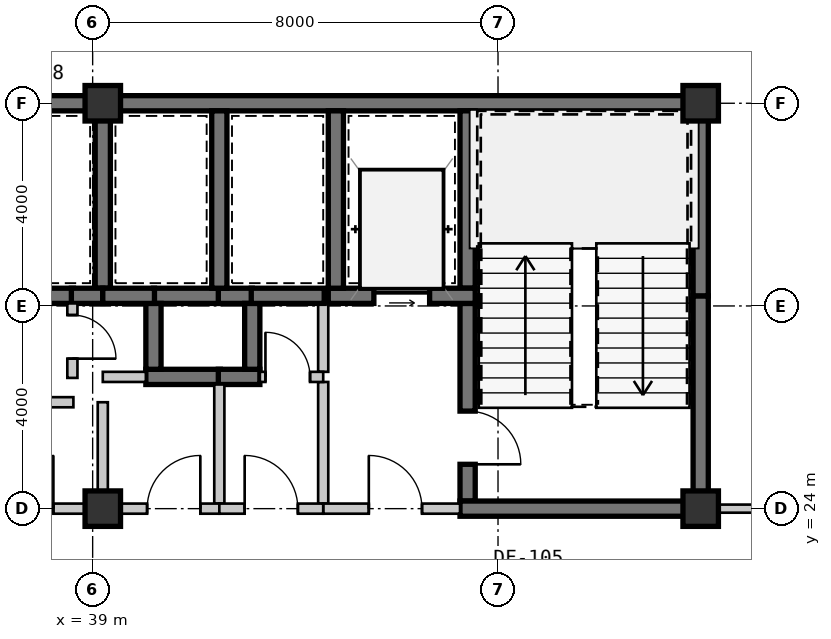
"""IFC4 building model, lengths in metres.
Left out: names, types, materials, properties, quantities, classifications, styles, units other than length and angle.
Written with IfcOpenShell. Run it as: python <this file> out.ifc"""

import sys

from ifc_helpers import new_model, si_unit, direction, frame, frame_2d, origin, origin_2d, place, context, subcontext, project, spatial, rectangle, extrude, source, transform, mapped, element, fill, save


model = new_model("IFC4")
c1 = context("Model", 3, precision=1e-05, world=origin(), true_north=direction((0.0, 1.0)))
c2 = subcontext(c1, "Body", "Model", "MODEL_VIEW")
j1 = project(units=[si_unit("LENGTHUNIT", "METRE"), si_unit("PLANEANGLEUNIT", "RADIAN")], contexts=[c1])
p1 = place(None, origin())
s1 = spatial("IfcSite", under=j1, at=p1, CompositionType="ELEMENT")
p2 = place(p1, origin())
s2 = spatial("IfcBuilding", under=s1, at=p2, CompositionType="ELEMENT")
p3 = place(p2, frame((0.0, 0.0, 65.1)))
s3 = spatial("IfcBuildingStorey", under=s2, at=p3, CompositionType="ELEMENT", Elevation=65.1)
m1 = source(origin(), c2, "Body", "SweptSolid", [
    extrude(rectangle(XDim=0.7, YDim=0.7, at=origin_2d()), origin(), (0.0, 0.0, 1.0), 3.15),
])
for number, where, z_axis, x_axis in (
    (1, (39.2, 24.0, 0.0), (0.0, 0.0, 1.0), (1.0, 0.0, 0.0)),
    (2, (51.0, 24.0, 0.0), (0.0, 0.0, 1.0), (1.0, 0.0, 0.0)),
    (3, (39.2, 32.0, 0.0), (0.0, 0.0, 1.0), (1.0, 0.0, 0.0)),
    (4, (51.0, 32.0, 0.0), (0.0, 0.0, 1.0), (1.0, 0.0, 0.0)),
):
    element("IfcColumn", number, at=place(p3, frame(where, z_axis=z_axis, x_axis=x_axis)), inside=s3, PredefinedType="COLUMN", context=c2, shape_type="MappedRepresentation", body=[
        mapped(m1, transform((0.0, 0.0, 0.0), scale=1.0)),
    ])
m2 = source(origin(), c2, "Body", "SweptSolid", [
    extrude(rectangle(XDim=11.2, YDim=0.3, at=frame_2d((5.6, 0.0))), origin(), (0.0, 0.0, 1.0), 2.93),
])
p4 = place(p3, frame((28.0, 32.0, 0.0), z_axis=(0.0, 0.0, 1.0), x_axis=(1.0, 0.0, 0.0)))
e5 = element("IfcWall", 5, at=p4, inside=s3, PredefinedType="SHEAR", context=c2, shape_type="MappedRepresentation", body=[
    mapped(m2, transform((0.0, 0.0, 0.0), scale=1.0)),
])
m3 = source(origin(), c2, "Body", "SweptSolid", [
    extrude(rectangle(XDim=11.95, YDim=0.3, at=frame_2d((5.975, 0.0))), origin(), (0.0, 0.0, 1.0), 2.93),
])
p5 = place(p3, frame((39.2, 32.0, 0.0), z_axis=(0.0, 0.0, 1.0), x_axis=(1.0, 0.0, 0.0)))
e6 = element("IfcWall", 6, at=p5, inside=s3, PredefinedType="SHEAR", context=c2, shape_type="MappedRepresentation", body=[
    mapped(m3, transform((0.0, 0.0, 0.0), scale=1.0)),
])
m4 = source(origin(), c2, "Body", "SweptSolid", [
    extrude(rectangle(XDim=4.05, YDim=0.3, at=frame_2d((2.025, 0.0))), origin(), (0.0, 0.0, 1.0), 2.93),
])
p6 = place(p3, frame((51.0, 24.15, 0.0), z_axis=(0.0, 0.0, 1.0), x_axis=(0.0, 1.0, 0.0)))
e7 = element("IfcWall", 7, at=p6, inside=s3, PredefinedType="SHEAR", context=c2, shape_type="MappedRepresentation", body=[
    mapped(m4, transform((0.0, 0.0, 0.0), scale=1.0)),
])
m5 = source(origin(), c2, "Body", "SweptSolid", [
    extrude(rectangle(XDim=3.65, YDim=0.3, at=frame_2d((1.825, 0.0))), origin(), (0.0, 0.0, 1.0), 2.93),
])
p7 = place(p3, frame((51.0, 28.2, 0.0), z_axis=(0.0, 0.0, 1.0), x_axis=(0.0, 1.0, 0.0)))
e8 = element("IfcWall", 8, at=p7, inside=s3, PredefinedType="SHEAR", context=c2, shape_type="MappedRepresentation", body=[
    mapped(m5, transform((0.0, 0.0, 0.0), scale=1.0)),
])
m6 = source(origin(), c2, "Body", "SweptSolid", [
    extrude(rectangle(XDim=3.5, YDim=0.3, at=frame_2d((1.75, 0.0))), origin(), (0.0, 0.0, 1.0), 2.93),
])
p8 = place(p3, frame((46.4, 31.85, 0.0), z_axis=(0.0, 0.0, 1.0), x_axis=(0.0, -1.0, 0.0)))
e9 = element("IfcWall", 9, at=p8, inside=s3, PredefinedType="SHEAR", context=c2, shape_type="MappedRepresentation", body=[
    mapped(m6, transform((0.0, 0.0, 0.0), scale=1.0)),
])
m7 = source(origin(), c2, "Body", "SweptSolid", [
    extrude(rectangle(XDim=3.9, YDim=0.3, at=frame_2d((1.95, 0.0))), origin(), (0.0, 0.0, 1.0), 2.93),
])
p9 = place(p3, frame((46.4, 28.05, 0.0), z_axis=(0.0, 0.0, 1.0), x_axis=(0.0, -1.0, 0.0)))
e10 = element("IfcWall", 10, at=p9, inside=s3, PredefinedType="SHEAR", context=c2, shape_type="MappedRepresentation", body=[
    mapped(m7, transform((0.0, 0.0, 0.0), scale=1.0)),
])
m8 = source(origin(), c2, "Body", "SweptSolid", [
    extrude(rectangle(XDim=1.05, YDim=2.1, at=frame_2d((0.525, 1.05))), frame((0.0, 0.16, 0.0), z_axis=(0.0, -1.0, 0.0), x_axis=(1.0, 0.0, 0.0)), (0.0, 0.0, 1.0), 0.32),
])
p10 = place(p9, frame((2.125, 0.0, 0.0)))
e11 = element("IfcOpeningElement", 11, at=p10, cuts=e10, PredefinedType="OPENING", context=c2, shape_type="MappedRepresentation", body=[
    mapped(m8, transform((0.0, 0.0, 0.0), scale=1.0)),
])
m9 = source(origin(), c2, "Body", "SweptSolid", [
    extrude(rectangle(XDim=4.9, YDim=0.3, at=frame_2d((2.45, 0.0))), origin(), (0.0, 0.0, 1.0), 2.93),
])
p11 = place(p3, frame((46.25, 24.0, 0.0), z_axis=(0.0, 0.0, 1.0), x_axis=(1.0, 0.0, 0.0)))
e12 = element("IfcWall", 12, at=p11, inside=s3, PredefinedType="SHEAR", context=c2, shape_type="MappedRepresentation", body=[
    mapped(m9, transform((0.0, 0.0, 0.0), scale=1.0)),
])
m10 = source(origin(), c2, "Body", "SweptSolid", [
    extrude(rectangle(XDim=2.9, YDim=0.3, at=frame_2d((1.45, 0.0))), origin(), (0.0, 0.0, 1.0), 2.93),
])
p12 = place(p3, frame((43.65, 28.2, 0.0), z_axis=(0.0, 0.0, 1.0), x_axis=(1.0, 0.0, 0.0)))
e13 = element("IfcWall", 13, at=p12, inside=s3, PredefinedType="SHEAR", context=c2, shape_type="MappedRepresentation", body=[
    mapped(m10, transform((0.0, 0.0, 0.0), scale=1.0)),
])
m11 = source(origin(), c2, "Body", "SweptSolid", [
    extrude(rectangle(XDim=1.1, YDim=2.15, at=frame_2d((0.55, 1.075))), frame((0.0, 0.16, 0.0), z_axis=(0.0, -1.0, 0.0), x_axis=(1.0, 0.0, 0.0)), (0.0, 0.0, 1.0), 0.32),
])
p13 = place(p12, frame((0.9, 0.0, 0.0)))
e14 = element("IfcOpeningElement", 14, at=p13, cuts=e13, PredefinedType="OPENING", context=c2, shape_type="MappedRepresentation", body=[
    mapped(m11, transform((0.0, 0.0, 0.0), scale=1.0)),
])
p14 = place(p3, frame((43.8, 31.85, 0.0), z_axis=(0.0, 0.0, 1.0), x_axis=(0.0, -1.0, 0.0)))
e15 = element("IfcWall", 15, at=p14, inside=s3, PredefinedType="SHEAR", context=c2, shape_type="MappedRepresentation", body=[
    mapped(m6, transform((0.0, 0.0, 0.0), scale=1.0)),
])
m12 = source(origin(), c2, "Body", "SweptSolid", [
    extrude(rectangle(XDim=2.4, YDim=0.2, at=frame_2d((1.2, 0.0))), origin(), (0.0, 0.0, 1.0), 2.93),
])
p15 = place(p3, frame((43.55, 26.5, 0.0), z_axis=(0.0, 0.0, 1.0), x_axis=(0.0, -1.0, 0.0)))
e16 = element("IfcWall", 16, at=p15, inside=s3, PredefinedType="SOLIDWALL", context=c2, shape_type="MappedRepresentation", body=[
    mapped(m12, transform((0.0, 0.0, 0.0), scale=1.0)),
])
m13 = source(origin(), c2, "Body", "SweptSolid", [
    extrude(rectangle(XDim=1.35, YDim=0.2, at=frame_2d((0.675, 0.0))), origin(), (0.0, 0.0, 1.0), 2.93),
])
p16 = place(p3, frame((43.55, 28.05, 0.0), z_axis=(0.0, 0.0, 1.0), x_axis=(0.0, -1.0, 0.0)))
e17 = element("IfcWall", 17, at=p16, inside=s3, PredefinedType="SOLIDWALL", context=c2, shape_type="MappedRepresentation", body=[
    mapped(m13, transform((0.0, 0.0, 0.0), scale=1.0)),
])
m14 = source(origin(), c2, "Body", "SweptSolid", [
    extrude(rectangle(XDim=2.7, YDim=0.2, at=frame_2d((1.35, 0.0))), origin(), (0.0, 0.0, 1.0), 2.397),
])
p17 = place(p3, frame((43.55, 24.0, 0.0), z_axis=(0.0, 0.0, 1.0), x_axis=(1.0, 0.0, 0.0)))
e18 = element("IfcWall", 18, at=p17, inside=s3, PredefinedType="SOLIDWALL", context=c2, shape_type="MappedRepresentation", body=[
    mapped(m14, transform((0.0, 0.0, 0.0), scale=1.0)),
])
m15 = source(origin(), c2, "Body", "SweptSolid", [
    extrude(rectangle(XDim=1.05, YDim=2.1, at=frame_2d((0.525, 1.05))), frame((0.0, 0.11, 0.0), z_axis=(0.0, -1.0, 0.0), x_axis=(1.0, 0.0, 0.0)), (0.0, 0.0, 1.0), 0.22),
])
p18 = place(p17, frame((0.9, 0.0, 0.0)))
e19 = element("IfcOpeningElement", 19, at=p18, cuts=e18, PredefinedType="OPENING", context=c2, shape_type="MappedRepresentation", body=[
    mapped(m15, transform((0.0, 0.0, 0.0), scale=1.0)),
])
m16 = source(origin(), c2, "Body", "SweptSolid", [
    extrude(rectangle(XDim=1.32, YDim=0.3, at=frame_2d((0.66, 0.0))), origin(), (0.0, 0.0, 1.0), 2.93),
])
p19 = place(p3, frame((41.52, 28.2, 0.0), z_axis=(0.0, 0.0, 1.0), x_axis=(-1.0, 0.0, 0.0)))
e20 = element("IfcWall", 20, at=p19, inside=s3, PredefinedType="SHEAR", context=c2, shape_type="MappedRepresentation", body=[
    mapped(m16, transform((0.0, 0.0, 0.0), scale=1.0)),
])
m17 = source(origin(), c2, "Body", "SweptSolid", [
    extrude(rectangle(XDim=0.67, YDim=0.3, at=frame_2d((0.335, 0.0))), origin(), (0.0, 0.0, 1.0), 2.93),
])
p20 = place(p3, frame((42.15, 28.2, 0.0), z_axis=(0.0, 0.0, 1.0), x_axis=(-1.0, 0.0, 0.0)))
e21 = element("IfcWall", 21, at=p20, inside=s3, PredefinedType="SHEAR", context=c2, shape_type="MappedRepresentation", body=[
    mapped(m17, transform((0.0, 0.0, 0.0), scale=1.0)),
])
m18 = source(origin(), c2, "Body", "SweptSolid", [
    extrude(rectangle(XDim=1.47, YDim=0.3, at=frame_2d((0.735, 0.0))), origin(), (0.0, 0.0, 1.0), 2.93),
])
p21 = place(p3, frame((40.05, 26.6, 0.0), z_axis=(0.0, 0.0, 1.0), x_axis=(1.0, 0.0, 0.0)))
e22 = element("IfcWall", 22, at=p21, inside=s3, PredefinedType="SHEAR", context=c2, shape_type="MappedRepresentation", body=[
    mapped(m18, transform((0.0, 0.0, 0.0), scale=1.0)),
])
m19 = source(origin(), c2, "Body", "SweptSolid", [
    extrude(rectangle(XDim=1.3, YDim=0.3, at=frame_2d((0.65, 0.0))), origin(), (0.0, 0.0, 1.0), 2.93),
])
p22 = place(p3, frame((40.2, 28.05, 0.0), z_axis=(0.0, 0.0, 1.0), x_axis=(0.0, -1.0, 0.0)))
e23 = element("IfcWall", 23, at=p22, inside=s3, PredefinedType="SHEAR", context=c2, shape_type="MappedRepresentation", body=[
    mapped(m19, transform((0.0, 0.0, 0.0), scale=1.0)),
])
m20 = source(origin(), c2, "Body", "SweptSolid", [
    extrude(rectangle(XDim=0.82, YDim=0.3, at=frame_2d((0.41, 0.0))), origin(), (0.0, 0.0, 1.0), 2.93),
])
p23 = place(p3, frame((41.48, 26.6, 0.0), z_axis=(0.0, 0.0, 1.0), x_axis=(1.0, 0.0, 0.0)))
e24 = element("IfcWall", 24, at=p23, inside=s3, PredefinedType="SHEAR", context=c2, shape_type="MappedRepresentation", body=[
    mapped(m20, transform((0.0, 0.0, 0.0), scale=1.0)),
])
p24 = place(p3, frame((42.15, 26.75, 0.0), z_axis=(0.0, 0.0, 1.0), x_axis=(0.0, 1.0, 0.0)))
e25 = element("IfcWall", 25, at=p24, inside=s3, PredefinedType="SHEAR", context=c2, shape_type="MappedRepresentation", body=[
    mapped(m19, transform((0.0, 0.0, 0.0), scale=1.0)),
])
p25 = place(p3, frame((39.2, 28.35, 0.0), z_axis=(0.0, 0.0, 1.0), x_axis=(0.0, 1.0, 0.0)))
e26 = element("IfcWall", 26, at=p25, inside=s3, PredefinedType="SHEAR", context=c2, shape_type="MappedRepresentation", body=[
    mapped(m6, transform((0.0, 0.0, 0.0), scale=1.0)),
])
m21 = source(origin(), c2, "Body", "SweptSolid", [
    extrude(rectangle(XDim=1.92, YDim=0.3, at=frame_2d((0.96, 0.0))), origin(), (0.0, 0.0, 1.0), 2.93),
])
p26 = place(p3, frame((36.7, 28.2, 0.0), z_axis=(0.0, 0.0, 1.0), x_axis=(1.0, 0.0, 0.0)))
e27 = element("IfcWall", 27, at=p26, inside=s3, PredefinedType="SHEAR", context=c2, shape_type="MappedRepresentation", body=[
    mapped(m21, transform((0.0, 0.0, 0.0), scale=1.0)),
])
m22 = source(origin(), c2, "Body", "SweptSolid", [
    extrude(rectangle(XDim=0.62, YDim=0.3, at=frame_2d((0.31, 0.0))), origin(), (0.0, 0.0, 1.0), 2.93),
])
p27 = place(p3, frame((38.58, 28.2, 0.0), z_axis=(0.0, 0.0, 1.0), x_axis=(1.0, 0.0, 0.0)))
e28 = element("IfcWall", 28, at=p27, inside=s3, PredefinedType="SHEAR", context=c2, shape_type="MappedRepresentation", body=[
    mapped(m22, transform((0.0, 0.0, 0.0), scale=1.0)),
])
p28 = place(p3, frame((41.5, 28.35, 0.0), z_axis=(0.0, 0.0, 1.0), x_axis=(0.0, 1.0, 0.0)))
e29 = element("IfcWall", 29, at=p28, inside=s3, PredefinedType="SHEAR", context=c2, shape_type="MappedRepresentation", body=[
    mapped(m6, transform((0.0, 0.0, 0.0), scale=1.0)),
])
m23 = source(origin(), c2, "Body", "SweptSolid", [
    extrude(rectangle(XDim=1.02, YDim=0.3, at=frame_2d((0.51, 0.0))), origin(), (0.0, 0.0, 1.0), 2.93),
])
p29 = place(p3, frame((39.2, 28.2, 0.0), z_axis=(0.0, 0.0, 1.0), x_axis=(1.0, 0.0, 0.0)))
e30 = element("IfcWall", 30, at=p29, inside=s3, PredefinedType="SHEAR", context=c2, shape_type="MappedRepresentation", body=[
    mapped(m23, transform((0.0, 0.0, 0.0), scale=1.0)),
])
m24 = source(origin(), c2, "Body", "SweptSolid", [
    extrude(rectangle(XDim=1.44, YDim=0.3, at=frame_2d((0.72, 0.0))), origin(), (0.0, 0.0, 1.0), 2.93),
])
p30 = place(p3, frame((42.13, 28.2, 0.0), z_axis=(0.0, 0.0, 1.0), x_axis=(1.0, 0.0, 0.0)))
e31 = element("IfcWall", 31, at=p30, inside=s3, PredefinedType="SHEAR", context=c2, shape_type="MappedRepresentation", body=[
    mapped(m24, transform((0.0, 0.0, 0.0), scale=1.0)),
])
m25 = source(origin(), c2, "Body", "SweptSolid", [
    extrude(rectangle(XDim=2.42, YDim=0.2, at=frame_2d((1.21, 0.0))), origin(), (0.0, 0.0, 1.0), 2.93),
])
p31 = place(p3, frame((36.2, 26.1, 0.0), z_axis=(0.0, 0.0, 1.0), x_axis=(1.0, 0.0, 0.0)))
e32 = element("IfcWall", 32, at=p31, inside=s3, PredefinedType="SOLIDWALL", context=c2, shape_type="MappedRepresentation", body=[
    mapped(m25, transform((0.0, 0.0, 0.0), scale=1.0)),
])
p32 = place(p31, frame((0.685, 0.0, 0.0)))
e33 = element("IfcOpeningElement", 33, at=p32, cuts=e32, PredefinedType="OPENING", context=c2, shape_type="MappedRepresentation", body=[
    mapped(m15, transform((0.0, 0.0, 0.0), scale=1.0)),
])
m26 = source(origin(), c2, "Body", "SweptSolid", [
    extrude(rectangle(XDim=2.0, YDim=0.2, at=frame_2d((1.0, 0.0))), origin(), (0.0, 0.0, 1.0), 2.47),
])
p33 = place(p3, frame((39.2, 26.1, 0.0), z_axis=(0.0, 0.0, 1.0), x_axis=(0.0, -1.0, 0.0)))
e34 = element("IfcWall", 34, at=p33, inside=s3, PredefinedType="SOLIDWALL", context=c2, shape_type="MappedRepresentation", body=[
    mapped(m26, transform((0.0, 0.0, 0.0), scale=1.0)),
])
m27 = source(origin(), c2, "Body", "SweptSolid", [
    extrude(rectangle(XDim=3.0, YDim=0.2, at=frame_2d((1.5, 0.0))), origin(), (0.0, 0.0, 1.0), 2.47),
])
p34 = place(p3, frame((39.2, 24.0, 0.0), z_axis=(0.0, 0.0, 1.0), x_axis=(-1.0, 0.0, 0.0)))
e35 = element("IfcWall", 35, at=p34, inside=s3, PredefinedType="SOLIDWALL", context=c2, shape_type="MappedRepresentation", body=[
    mapped(m27, transform((0.0, 0.0, 0.0), scale=1.0)),
])
p35 = place(p34, frame((0.975, 0.0, 0.0)))
e36 = element("IfcOpeningElement", 36, at=p35, cuts=e35, PredefinedType="OPENING", context=c2, shape_type="MappedRepresentation", body=[
    mapped(m15, transform((0.0, 0.0, 0.0), scale=1.0)),
])
m28 = source(origin(), c2, "Body", "SweptSolid", [
    extrude(rectangle(XDim=1.47, YDim=0.2, at=frame_2d((0.735, 0.0))), origin(), (0.0, 0.0, 1.0), 2.93),
])
p36 = place(p3, frame((38.6, 28.05, 0.0), z_axis=(0.0, 0.0, 1.0), x_axis=(0.0, -1.0, 0.0)))
e37 = element("IfcWall", 37, at=p36, inside=s3, PredefinedType="SOLIDWALL", context=c2, shape_type="MappedRepresentation", body=[
    mapped(m28, transform((0.0, 0.0, 0.0), scale=1.0)),
])
m29 = source(origin(), c2, "Body", "SweptSolid", [
    extrude(rectangle(XDim=0.86, YDim=2.1, at=frame_2d((0.43, 1.05))), frame((0.0, 0.11, 0.0), z_axis=(0.0, -1.0, 0.0), x_axis=(1.0, 0.0, 0.0)), (0.0, 0.0, 1.0), 0.22),
])
p37 = place(p36, frame((0.23, 0.0, 0.0)))
e38 = element("IfcOpeningElement", 38, at=p37, cuts=e37, PredefinedType="OPENING", context=c2, shape_type="MappedRepresentation", body=[
    mapped(m29, transform((0.0, 0.0, 0.0), scale=1.0)),
])
m30 = source(origin(), c2, "Body", "SweptSolid", [
    extrude(rectangle(XDim=0.85, YDim=0.2, at=frame_2d((0.425, 0.0))), origin(), (0.0, 0.0, 1.0), 2.93),
])
p38 = place(p3, frame((39.2, 26.6, 0.0), z_axis=(0.0, 0.0, 1.0), x_axis=(1.0, 0.0, 0.0)))
e39 = element("IfcWall", 39, at=p38, inside=s3, PredefinedType="SOLIDWALL", context=c2, shape_type="MappedRepresentation", body=[
    mapped(m30, transform((0.0, 0.0, 0.0), scale=1.0)),
])
m31 = source(origin(), c2, "Body", "SweptSolid", [
    extrude(rectangle(XDim=2.35, YDim=0.2, at=frame_2d((1.175, 0.0))), origin(), (0.0, 0.0, 1.0), 2.93),
])
p39 = place(p3, frame((41.5, 26.45, 0.0), z_axis=(0.0, 0.0, 1.0), x_axis=(0.0, -1.0, 0.0)))
e40 = element("IfcWall", 40, at=p39, inside=s3, PredefinedType="SOLIDWALL", context=c2, shape_type="MappedRepresentation", body=[
    mapped(m31, transform((0.0, 0.0, 0.0), scale=1.0)),
])
m32 = source(origin(), c2, "Body", "SweptSolid", [
    extrude(rectangle(XDim=2.3, YDim=0.2, at=frame_2d((1.15, 0.0))), origin(), (0.0, 0.0, 1.0), 2.397),
])
p40 = place(p3, frame((41.5, 24.0, 0.0), z_axis=(0.0, 0.0, 1.0), x_axis=(-1.0, 0.0, 0.0)))
e41 = element("IfcWall", 41, at=p40, inside=s3, PredefinedType="SOLIDWALL", context=c2, shape_type="MappedRepresentation", body=[
    mapped(m32, transform((0.0, 0.0, 0.0), scale=1.0)),
])
p41 = place(p40, frame((0.375, 0.0, 0.0)))
e42 = element("IfcOpeningElement", 42, at=p41, cuts=e41, PredefinedType="OPENING", context=c2, shape_type="MappedRepresentation", body=[
    mapped(m15, transform((0.0, 0.0, 0.0), scale=1.0)),
])
m33 = source(origin(), c2, "Body", "SweptSolid", [
    extrude(rectangle(XDim=1.25, YDim=0.2, at=frame_2d((0.625, 0.0))), origin(), (0.0, 0.0, 1.0), 2.93),
])
p42 = place(p3, frame((42.3, 26.6, 0.0), z_axis=(0.0, 0.0, 1.0), x_axis=(1.0, 0.0, 0.0)))
e43 = element("IfcWall", 43, at=p42, inside=s3, PredefinedType="SOLIDWALL", context=c2, shape_type="MappedRepresentation", body=[
    mapped(m33, transform((0.0, 0.0, 0.0), scale=1.0)),
])
m34 = source(origin(), c2, "Body", "SweptSolid", [
    extrude(rectangle(XDim=0.88, YDim=2.1, at=frame_2d((0.44, 1.05))), frame((0.0, 0.11, 0.0), z_axis=(0.0, -1.0, 0.0), x_axis=(1.0, 0.0, 0.0)), (0.0, 0.0, 1.0), 0.22),
])
p43 = place(p42, frame((0.11, 0.0, 0.0)))
e44 = element("IfcOpeningElement", 44, at=p43, cuts=e43, PredefinedType="OPENING", context=c2, shape_type="MappedRepresentation", body=[
    mapped(m34, transform((0.0, 0.0, 0.0), scale=1.0)),
])
m35 = source(origin(), c2, "Body", "SweptSolid", [
    extrude(rectangle(XDim=2.05, YDim=0.2, at=frame_2d((1.025, 0.0))), origin(), (0.0, 0.0, 1.0), 2.397),
])
p44 = place(p3, frame((43.55, 24.0, 0.0), z_axis=(0.0, 0.0, 1.0), x_axis=(-1.0, 0.0, 0.0)))
e45 = element("IfcWall", 45, at=p44, inside=s3, PredefinedType="SOLIDWALL", context=c2, shape_type="MappedRepresentation", body=[
    mapped(m35, transform((0.0, 0.0, 0.0), scale=1.0)),
])
p45 = place(p44, frame((0.5, 0.0, 0.0)))
e46 = element("IfcOpeningElement", 46, at=p45, cuts=e45, PredefinedType="OPENING", context=c2, shape_type="MappedRepresentation", body=[
    mapped(m15, transform((0.0, 0.0, 0.0), scale=1.0)),
])
m36 = source(origin(), c2, "Body", "SweptSolid", [
    extrude(rectangle(XDim=1.155, YDim=0.16, at=frame_2d((0.577, 0.0))), origin(), (0.0, 0.0, 1.0), 2.328),
])
p46 = place(p3, frame((51.15, 24.0, 0.0), z_axis=(0.0, 0.0, 1.0), x_axis=(1.0, 0.0, 0.0)))
e47 = element("IfcWall", 47, at=p46, inside=s3, PredefinedType="PARTITIONING", context=c2, shape_type="MappedRepresentation", body=[
    mapped(m36, transform((0.0, 0.0, 0.0), scale=1.0)),
])
m37 = source(origin(), c2, "Body", "SweptSolid", [
    extrude(rectangle(XDim=1.05, YDim=2.1, at=frame_2d((0.525, 1.05))), frame((0.0, 0.025, 0.0), z_axis=(0.0, -1.0, 0.0), x_axis=(1.0, 0.0, 0.0)), (0.0, 0.0, 1.0), 0.05),
])
p47 = place(p10, origin())
e48 = element("IfcDoor", 48, at=p47, inside=s3, OperationType="SINGLE_SWING_RIGHT", PredefinedType="DOOR", context=c2, shape_type="MappedRepresentation", body=[
    mapped(m37, transform((0.0, 0.0, 0.0), scale=1.0)),
])
fill(e11, e48)
m38 = source(origin(), c2, "Body", "SweptSolid", [
    extrude(rectangle(XDim=1.1, YDim=2.15, at=frame_2d((0.55, 1.075))), frame((0.0, 0.025, 0.0), z_axis=(0.0, -1.0, 0.0), x_axis=(1.0, 0.0, 0.0)), (0.0, 0.0, 1.0), 0.05),
])
p48 = place(p13, origin())
e49 = element("IfcDoor", 49, at=p48, inside=s3, OperationType="SLIDING_TO_LEFT", PredefinedType="DOOR", context=c2, shape_type="MappedRepresentation", body=[
    mapped(m38, transform((0.0, 0.0, 0.0), scale=1.0)),
])
fill(e14, e49)
p49 = place(p18, origin())
e50 = element("IfcDoor", 50, at=p49, inside=s3, OperationType="SINGLE_SWING_LEFT", PredefinedType="DOOR", context=c2, shape_type="MappedRepresentation", body=[
    mapped(m37, transform((0.0, 0.0, 0.0), scale=1.0)),
])
fill(e19, e50)
p50 = place(p35, frame((1.05, 0.0, 0.0), z_axis=(0.0, 0.0, 1.0), x_axis=(-1.0, 0.0, 0.0)))
e51 = element("IfcDoor", 51, at=p50, inside=s3, OperationType="SINGLE_SWING_RIGHT", PredefinedType="DOOR", context=c2, shape_type="MappedRepresentation", body=[
    mapped(m37, transform((0.0, 0.0, 0.0), scale=1.0)),
])
fill(e36, e51)
p51 = place(p41, frame((1.05, 0.0, 0.0), z_axis=(0.0, 0.0, 1.0), x_axis=(-1.0, 0.0, 0.0)))
e52 = element("IfcDoor", 52, at=p51, inside=s3, OperationType="SINGLE_SWING_RIGHT", PredefinedType="DOOR", context=c2, shape_type="MappedRepresentation", body=[
    mapped(m37, transform((0.0, 0.0, 0.0), scale=1.0)),
])
fill(e42, e52)
m39 = source(origin(), c2, "Body", "SweptSolid", [
    extrude(rectangle(XDim=0.88, YDim=2.1, at=frame_2d((0.44, 1.05))), frame((0.0, 0.025, 0.0), z_axis=(0.0, -1.0, 0.0), x_axis=(1.0, 0.0, 0.0)), (0.0, 0.0, 1.0), 0.05),
])
p52 = place(p43, origin())
e53 = element("IfcDoor", 53, at=p52, inside=s3, OperationType="SINGLE_SWING_LEFT", PredefinedType="DOOR", context=c2, shape_type="MappedRepresentation", body=[
    mapped(m39, transform((0.0, 0.0, 0.0), scale=1.0)),
])
fill(e44, e53)
p53 = place(p45, frame((1.05, 0.0, 0.0), z_axis=(0.0, 0.0, 1.0), x_axis=(-1.0, 0.0, 0.0)))
e54 = element("IfcDoor", 54, at=p53, inside=s3, OperationType="SINGLE_SWING_LEFT", PredefinedType="DOOR", context=c2, shape_type="MappedRepresentation", body=[
    mapped(m37, transform((0.0, 0.0, 0.0), scale=1.0)),
])
fill(e46, e54)
m40 = source(origin(), c2, "Body", "SweptSolid", [
    extrude(rectangle(XDim=0.86, YDim=2.1, at=frame_2d((0.43, 1.05))), frame((0.0, 0.025, 0.0), z_axis=(0.0, -1.0, 0.0), x_axis=(1.0, 0.0, 0.0)), (0.0, 0.0, 1.0), 0.05),
])
p54 = place(p37, origin())
e55 = element("IfcDoor", 55, at=p54, inside=s3, OperationType="SINGLE_SWING_RIGHT", PredefinedType="DOOR", context=c2, shape_type="MappedRepresentation", body=[
    mapped(m40, transform((0.0, 0.0, 0.0), scale=1.0)),
])
fill(e38, e55)
save(model, sys.argv[1])
